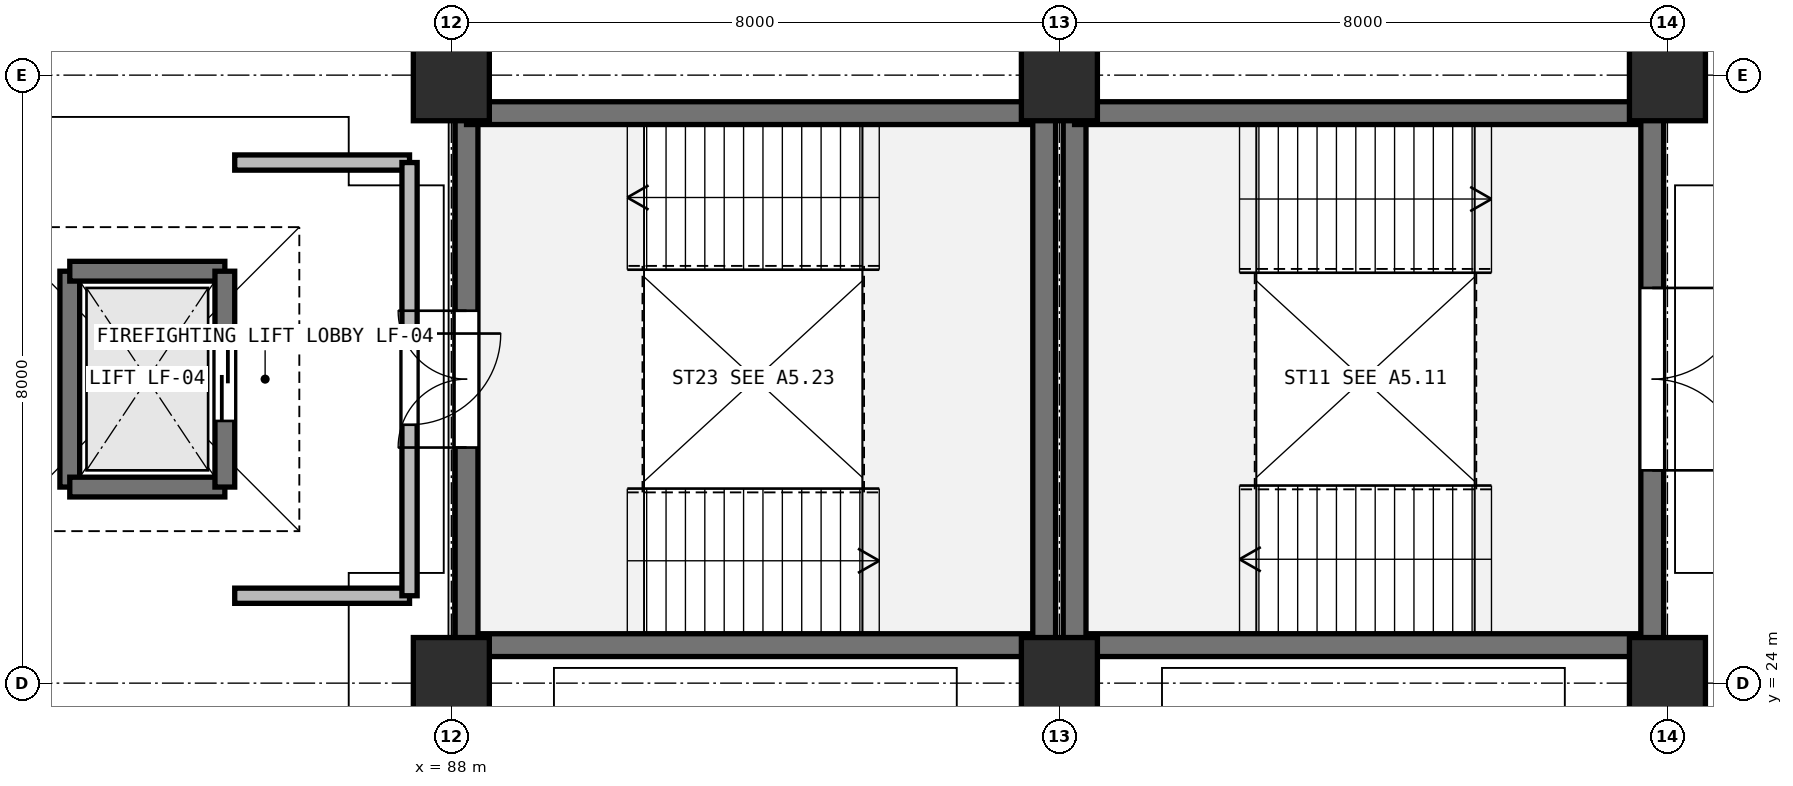
"""IFC4 building model, lengths in metres.
Left out: names, types, materials, properties, quantities, classifications, styles, units other than length and angle.
Written with IfcOpenShell. Run it as: python <this file> out.ifc"""

import sys

from ifc_helpers import new_model, si_unit, direction, frame, frame_2d, origin, origin_2d, place, context, subcontext, project, spatial, rectangle, extrude, element, fill, save


model = new_model("IFC4")
c1 = context("Model", 3, precision=1e-05, world=origin(), true_north=direction((0.0, 1.0)))
c2 = subcontext(c1, "Body", "Model", "MODEL_VIEW")
j1 = project(units=[si_unit("LENGTHUNIT", "METRE"), si_unit("PLANEANGLEUNIT", "RADIAN")], contexts=[c1])
p1 = place(None, origin())
s1 = spatial("IfcSite", under=j1, at=p1, CompositionType="ELEMENT")
p2 = place(p1, origin())
s2 = spatial("IfcBuilding", under=s1, at=p2, CompositionType="ELEMENT")
p3 = place(p2, frame((0.0, 0.0, 10.2)))
s3 = spatial("IfcBuildingStorey", under=s2, at=p3, CompositionType="ELEMENT", Elevation=10.2)
for number, where, z_axis, x_axis in (
    (1, (88.0, 24.0, 0.0), (0.0, 0.0, 1.0), (1.0, 0.0, 0.0)),
    (2, (88.0, 32.0, 0.0), (0.0, 0.0, 1.0), (1.0, 0.0, 0.0)),
    (3, (96.0, 24.0, 0.0), (0.0, 0.0, 1.0), (1.0, 0.0, 0.0)),
    (4, (96.0, 32.0, 0.0), (0.0, 0.0, 1.0), (1.0, 0.0, 0.0)),
    (5, (104.0, 24.0, 0.0), (0.0, 0.0, 1.0), (1.0, 0.0, 0.0)),
    (6, (104.0, 32.0, 0.0), (0.0, 0.0, 1.0), (1.0, 0.0, 0.0)),
):
    element("IfcColumn", number, at=place(p3, frame(where, z_axis=z_axis, x_axis=x_axis)), inside=s3, PredefinedType="COLUMN", context=c2, shape_type="SweptSolid", body=[
        extrude(rectangle(XDim=1.0, YDim=1.2, at=origin_2d()), origin(), (0.0, 0.0, 1.0), 4.8),
    ])
p4 = place(p3, frame((103.8, 24.5, 0.0), z_axis=(0.0, 0.0, 1.0), x_axis=(-1.0, 0.0, 0.0)))
e7 = element("IfcWall", 7, at=p4, inside=s3, PredefinedType="SHEAR", context=c2, shape_type="SweptSolid", body=[
    extrude(rectangle(XDim=7.6, YDim=0.3, at=frame_2d((3.8, 0.0))), origin(), (0.0, 0.0, 1.0), 4.46),
])
p5 = place(p3, frame((96.2, 24.5, 0.0), z_axis=(0.0, 0.0, 1.0), x_axis=(0.0, 1.0, 0.0)))
e8 = element("IfcWall", 8, at=p5, inside=s3, PredefinedType="SHEAR", context=c2, shape_type="SweptSolid", body=[
    extrude(rectangle(XDim=7.0, YDim=0.3, at=frame_2d((3.5, 0.0))), origin(), (0.0, 0.0, 1.0), 4.46),
])
p6 = place(p3, frame((96.2, 31.5, 0.0), z_axis=(0.0, 0.0, 1.0), x_axis=(1.0, 0.0, 0.0)))
e9 = element("IfcWall", 9, at=p6, inside=s3, PredefinedType="SHEAR", context=c2, shape_type="SweptSolid", body=[
    extrude(rectangle(XDim=7.6, YDim=0.3, at=frame_2d((3.8, 0.0))), origin(), (0.0, 0.0, 1.0), 4.46),
])
p7 = place(p3, frame((103.8, 31.5, 0.0), z_axis=(0.0, 0.0, 1.0), x_axis=(0.0, -1.0, 0.0)))
e10 = element("IfcWall", 10, at=p7, inside=s3, PredefinedType="SHEAR", context=c2, shape_type="SweptSolid", body=[
    extrude(rectangle(XDim=7.0, YDim=0.3, at=frame_2d((3.5, 0.0))), origin(), (0.0, 0.0, 1.0), 4.46),
])
p8 = place(p7, frame((2.3, 0.0, 0.0)))
e11 = element("IfcOpeningElement", 11, at=p8, cuts=e10, PredefinedType="OPENING", context=c2, shape_type="SweptSolid", body=[
    extrude(rectangle(XDim=2.4, YDim=2.2, at=frame_2d((1.2, 1.1))), frame((0.0, 0.16, 0.0), z_axis=(0.0, -1.0, 0.0), x_axis=(1.0, 0.0, 0.0)), (0.0, 0.0, 1.0), 0.32),
])
p9 = place(p3, frame((95.8, 24.5, 0.0), z_axis=(0.0, 0.0, 1.0), x_axis=(-1.0, 0.0, 0.0)))
e12 = element("IfcWall", 12, at=p9, inside=s3, PredefinedType="SHEAR", context=c2, shape_type="SweptSolid", body=[
    extrude(rectangle(XDim=7.6, YDim=0.3, at=frame_2d((3.8, 0.0))), origin(), (0.0, 0.0, 1.0), 4.46),
])
p10 = place(p3, frame((88.2, 24.5, 0.0), z_axis=(0.0, 0.0, 1.0), x_axis=(0.0, 1.0, 0.0)))
e13 = element("IfcWall", 13, at=p10, inside=s3, PredefinedType="SHEAR", context=c2, shape_type="SweptSolid", body=[
    extrude(rectangle(XDim=7.0, YDim=0.3, at=frame_2d((3.5, 0.0))), origin(), (0.0, 0.0, 1.0), 4.46),
])
p11 = place(p10, frame((2.6, 0.0, 0.0)))
e14 = element("IfcOpeningElement", 14, at=p11, cuts=e13, PredefinedType="OPENING", context=c2, shape_type="SweptSolid", body=[
    extrude(rectangle(XDim=1.8, YDim=2.2, at=frame_2d((0.9, 1.1))), frame((0.0, 0.16, 0.0), z_axis=(0.0, -1.0, 0.0), x_axis=(1.0, 0.0, 0.0)), (0.0, 0.0, 1.0), 0.32),
])
p12 = place(p3, frame((88.2, 31.5, 0.0), z_axis=(0.0, 0.0, 1.0), x_axis=(1.0, 0.0, 0.0)))
e15 = element("IfcWall", 15, at=p12, inside=s3, PredefinedType="SHEAR", context=c2, shape_type="SweptSolid", body=[
    extrude(rectangle(XDim=7.6, YDim=0.3, at=frame_2d((3.8, 0.0))), origin(), (0.0, 0.0, 1.0), 4.46),
])
p13 = place(p3, frame((95.8, 31.5, 0.0), z_axis=(0.0, 0.0, 1.0), x_axis=(0.0, -1.0, 0.0)))
e16 = element("IfcWall", 16, at=p13, inside=s3, PredefinedType="SHEAR", context=c2, shape_type="SweptSolid", body=[
    extrude(rectangle(XDim=7.0, YDim=0.3, at=frame_2d((3.5, 0.0))), origin(), (0.0, 0.0, 1.0), 4.46),
])
p14 = place(p3, frame((82.98, 26.58, 0.0), z_axis=(0.0, 0.0, 1.0), x_axis=(0.0, 1.0, 0.0)))
e17 = element("IfcWall", 17, at=p14, inside=s3, PredefinedType="SHEAR", context=c2, shape_type="SweptSolid", body=[
    extrude(rectangle(XDim=2.84, YDim=0.26, at=frame_2d((1.42, 0.0))), origin(), (0.0, 0.0, 1.0), 4.46),
])
for number, where, z_axis, x_axis in (
    (18, (82.98, 29.42, 0.0), (0.0, 0.0, 1.0), (1.0, 0.0, 0.0)),
    (19, (85.02, 26.58, 0.0), (0.0, 0.0, 1.0), (-1.0, 0.0, 0.0)),
):
    element("IfcWall", number, at=place(p3, frame(where, z_axis=z_axis, x_axis=x_axis)), inside=s3, PredefinedType="SHEAR", context=c2, shape_type="SweptSolid", body=[
        extrude(rectangle(XDim=2.04, YDim=0.26, at=frame_2d((1.02, 0.0))), origin(), (0.0, 0.0, 1.0), 4.46),
    ])
p15 = place(p3, frame((85.02, 29.42, 0.0), z_axis=(0.0, 0.0, 1.0), x_axis=(0.0, -1.0, 0.0)))
e20 = element("IfcWall", 20, at=p15, inside=s3, PredefinedType="SHEAR", context=c2, shape_type="SweptSolid", body=[
    extrude(rectangle(XDim=2.84, YDim=0.26, at=frame_2d((1.42, 0.0))), origin(), (0.0, 0.0, 1.0), 4.46),
])
p16 = place(p15, frame((0.87, 0.0, 0.0)))
e21 = element("IfcOpeningElement", 21, at=p16, cuts=e20, PredefinedType="OPENING", context=c2, shape_type="SweptSolid", body=[
    extrude(rectangle(XDim=1.1, YDim=2.15, at=frame_2d((0.55, 1.075))), frame((0.0, 0.14, 0.0), z_axis=(0.0, -1.0, 0.0), x_axis=(1.0, 0.0, 0.0)), (0.0, 0.0, 1.0), 0.28),
])
for number, where, z_axis, x_axis in (
    (22, (85.15, 30.85, 0.0), (0.0, 0.0, 1.0), (1.0, 0.0, 0.0)),
    (23, (87.45, 25.15, 0.0), (0.0, 0.0, 1.0), (-1.0, 0.0, 0.0)),
):
    element("IfcWall", number, at=place(p3, frame(where, z_axis=z_axis, x_axis=x_axis)), inside=s3, PredefinedType="PARTITIONING", context=c2, shape_type="SweptSolid", body=[
        extrude(rectangle(XDim=2.3, YDim=0.2, at=frame_2d((1.15, 0.0))), origin(), (0.0, 0.0, 1.0), 4.46),
    ])
p17 = place(p3, frame((87.45, 30.85, 0.0), z_axis=(0.0, 0.0, 1.0), x_axis=(0.0, -1.0, 0.0)))
e24 = element("IfcWall", 24, at=p17, inside=s3, PredefinedType="PARTITIONING", context=c2, shape_type="SweptSolid", body=[
    extrude(rectangle(XDim=5.7, YDim=0.2, at=frame_2d((2.85, 0.0))), origin(), (0.0, 0.0, 1.0), 3.6),
])
p18 = place(p17, frame((2.25, 0.0, 0.0)))
e25 = element("IfcOpeningElement", 25, at=p18, cuts=e24, PredefinedType="OPENING", context=c2, shape_type="SweptSolid", body=[
    extrude(rectangle(XDim=1.2, YDim=2.2, at=frame_2d((0.6, 1.1))), frame((0.0, 0.11, 0.0), z_axis=(0.0, -1.0, 0.0), x_axis=(1.0, 0.0, 0.0)), (0.0, 0.0, 1.0), 0.22),
])
p19 = place(p8, frame((2.4, 0.0, 0.0), z_axis=(0.0, 0.0, 1.0), x_axis=(-1.0, 0.0, 0.0)))
e26 = element("IfcDoor", 26, at=p19, inside=s3, OperationType="DOUBLE_DOOR_SINGLE_SWING", PredefinedType="DOOR", context=c2, shape_type="SweptSolid", body=[
    extrude(rectangle(XDim=2.4, YDim=2.2, at=frame_2d((1.2, 1.1))), frame((0.0, 0.025, 0.0), z_axis=(0.0, -1.0, 0.0), x_axis=(1.0, 0.0, 0.0)), (0.0, 0.0, 1.0), 0.05),
])
fill(e11, e26)
p20 = place(p11, frame((1.8, 0.0, 0.0), z_axis=(0.0, 0.0, 1.0), x_axis=(-1.0, 0.0, 0.0)))
e27 = element("IfcDoor", 27, at=p20, inside=s3, OperationType="DOUBLE_DOOR_SINGLE_SWING", PredefinedType="DOOR", context=c2, shape_type="SweptSolid", body=[
    extrude(rectangle(XDim=1.8, YDim=2.2, at=frame_2d((0.9, 1.1))), frame((0.0, 0.025, 0.0), z_axis=(0.0, -1.0, 0.0), x_axis=(1.0, 0.0, 0.0)), (0.0, 0.0, 1.0), 0.05),
])
fill(e14, e27)
p21 = place(p16, origin())
e28 = element("IfcDoor", 28, at=p21, inside=s3, OperationType="SLIDING_TO_LEFT", PredefinedType="DOOR", context=c2, shape_type="SweptSolid", body=[
    extrude(rectangle(XDim=1.1, YDim=2.15, at=frame_2d((0.55, 1.075))), frame((0.0, 0.025, 0.0), z_axis=(0.0, -1.0, 0.0), x_axis=(1.0, 0.0, 0.0)), (0.0, 0.0, 1.0), 0.05),
])
fill(e21, e28)
p22 = place(p18, origin())
e29 = element("IfcDoor", 29, at=p22, inside=s3, OperationType="SINGLE_SWING_LEFT", PredefinedType="DOOR", context=c2, shape_type="SweptSolid", body=[
    extrude(rectangle(XDim=1.2, YDim=2.2, at=frame_2d((0.6, 1.1))), frame((0.0, 0.025, 0.0), z_axis=(0.0, -1.0, 0.0), x_axis=(1.0, 0.0, 0.0)), (0.0, 0.0, 1.0), 0.05),
])
fill(e25, e29)
save(model, sys.argv[1])
